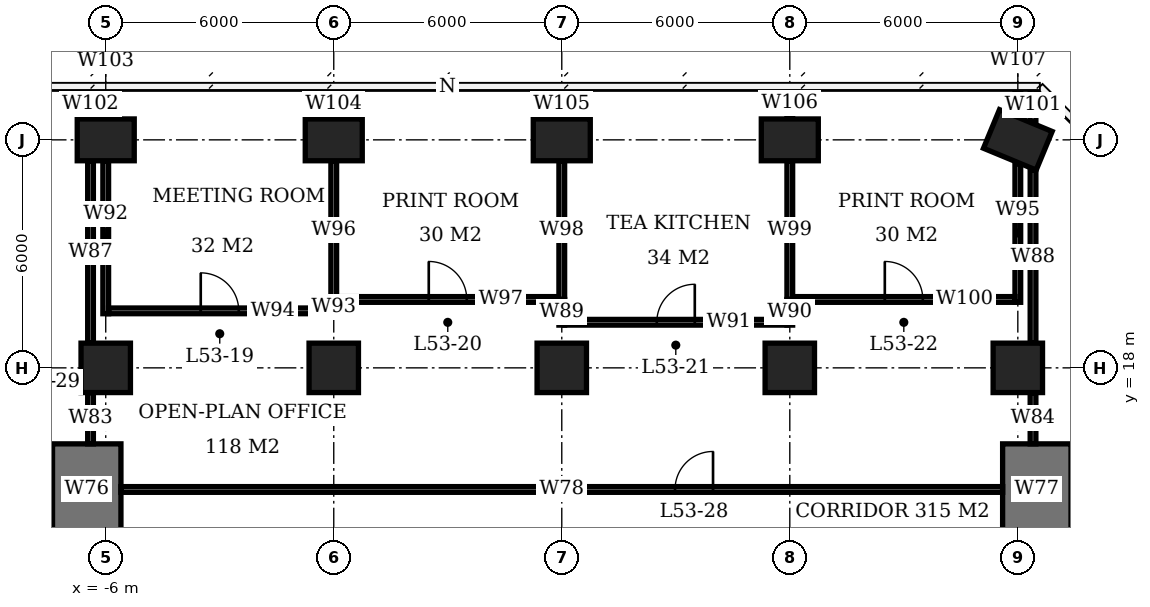
"""IFC4 building model, lengths in metres.
Left out: names, types, materials, properties, quantities, classifications, styles, units other than length and angle.
Written with IfcOpenShell. Run it as: python <this file> out.ifc"""

import sys

from ifc_helpers import new_model, si_unit, direction, frame, frame_2d, origin, origin_2d, place, context, subcontext, project, spatial, rectangle, extrude, element, fill, save


model = new_model("IFC4")
c1 = context("Model", 3, precision=1e-05, world=origin(), true_north=direction((0.0, 1.0)))
c2 = subcontext(c1, "Body", "Model", "MODEL_VIEW")
j1 = project(units=[si_unit("LENGTHUNIT", "METRE"), si_unit("PLANEANGLEUNIT", "RADIAN")], contexts=[c1])
p1 = place(None, origin())
s1 = spatial("IfcSite", under=j1, at=p1, CompositionType="ELEMENT")
p2 = place(p1, origin())
s2 = spatial("IfcBuilding", under=s1, at=p2, CompositionType="ELEMENT")
p3 = place(p2, frame((0.0, 0.0, 216.2)))
s3 = spatial("IfcBuildingStorey", under=s2, at=p3, CompositionType="ELEMENT", Elevation=216.2)
p4 = place(p3, frame((-6.0, 18.0, 0.0), z_axis=(0.0, 0.0, 1.0), x_axis=(1.0, 0.0, 0.0)))
e1 = element("IfcColumn", 1, at=p4, inside=s3, PredefinedType="COLUMN", context=c2, shape_type="SweptSolid", body=[
    extrude(rectangle(XDim=1.3, YDim=1.3, at=origin_2d()), origin(), (0.0, 0.0, 1.0), 3.9),
])
p5 = place(p3, frame((-6.0, 24.0, 0.0), z_axis=(0.0, 0.0, 1.0), x_axis=(1.0, 0.0, 0.0)))
e2 = element("IfcColumn", 2, at=p5, inside=s3, PredefinedType="COLUMN", context=c2, shape_type="SweptSolid", body=[
    extrude(rectangle(XDim=1.5, YDim=1.1, at=origin_2d()), origin(), (0.0, 0.0, 1.0), 3.9),
])
p6 = place(p3, frame((0.0, 18.0, 0.0), z_axis=(0.0, 0.0, 1.0), x_axis=(1.0, 0.0, 0.0)))
e3 = element("IfcColumn", 3, at=p6, inside=s3, PredefinedType="COLUMN", context=c2, shape_type="SweptSolid", body=[
    extrude(rectangle(XDim=1.3, YDim=1.3, at=origin_2d()), origin(), (0.0, 0.0, 1.0), 3.9),
])
p7 = place(p3, frame((0.0, 24.0, 0.0), z_axis=(0.0, 0.0, 1.0), x_axis=(1.0, 0.0, 0.0)))
e4 = element("IfcColumn", 4, at=p7, inside=s3, PredefinedType="COLUMN", context=c2, shape_type="SweptSolid", body=[
    extrude(rectangle(XDim=1.5, YDim=1.1, at=origin_2d()), origin(), (0.0, 0.0, 1.0), 3.9),
])
p8 = place(p3, frame((6.0, 18.0, 0.0), z_axis=(0.0, 0.0, 1.0), x_axis=(1.0, 0.0, 0.0)))
e5 = element("IfcColumn", 5, at=p8, inside=s3, PredefinedType="COLUMN", context=c2, shape_type="SweptSolid", body=[
    extrude(rectangle(XDim=1.3, YDim=1.3, at=origin_2d()), origin(), (0.0, 0.0, 1.0), 3.9),
])
p9 = place(p3, frame((6.0, 24.0, 0.0), z_axis=(0.0, 0.0, 1.0), x_axis=(1.0, 0.0, 0.0)))
e6 = element("IfcColumn", 6, at=p9, inside=s3, PredefinedType="COLUMN", context=c2, shape_type="SweptSolid", body=[
    extrude(rectangle(XDim=1.5, YDim=1.1, at=origin_2d()), origin(), (0.0, 0.0, 1.0), 3.9),
])
p10 = place(p3, frame((12.0, 18.0, 0.0), z_axis=(0.0, 0.0, 1.0), x_axis=(1.0, 0.0, 0.0)))
e7 = element("IfcColumn", 7, at=p10, inside=s3, PredefinedType="COLUMN", context=c2, shape_type="SweptSolid", body=[
    extrude(rectangle(XDim=1.3, YDim=1.3, at=origin_2d()), origin(), (0.0, 0.0, 1.0), 3.9),
])
p11 = place(p3, frame((12.0, 24.0, 0.0), z_axis=(0.0, 0.0, 1.0), x_axis=(1.0, 0.0, 0.0)))
e8 = element("IfcColumn", 8, at=p11, inside=s3, PredefinedType="COLUMN", context=c2, shape_type="SweptSolid", body=[
    extrude(rectangle(XDim=1.5, YDim=1.1, at=origin_2d()), origin(), (0.0, 0.0, 1.0), 3.9),
])
p12 = place(p3, frame((18.0, 18.0, 0.0), z_axis=(0.0, 0.0, 1.0), x_axis=(1.0, 0.0, 0.0)))
e9 = element("IfcColumn", 9, at=p12, inside=s3, PredefinedType="COLUMN", context=c2, shape_type="SweptSolid", body=[
    extrude(rectangle(XDim=1.3, YDim=1.3, at=origin_2d()), origin(), (0.0, 0.0, 1.0), 3.9),
])
p13 = place(p3, frame((18.0, 24.0, 0.0), z_axis=(0.0, 0.0, 1.0), x_axis=(0.923879532511, -0.382683432365, 0.0)))
e10 = element("IfcColumn", 10, at=p13, inside=s3, PredefinedType="COLUMN", context=c2, shape_type="SweptSolid", body=[
    extrude(rectangle(XDim=1.5, YDim=1.1, at=origin_2d()), origin(), (0.0, 0.0, 1.0), 3.9),
])
for number, where, z_axis, x_axis in (
    (11, (-6.5, 13.6, 0.0), (0.0, 0.0, 1.0), (0.0, 1.0, 0.0)),
    (12, (18.5, 13.6, 0.0), (0.0, 0.0, 1.0), (0.0, 1.0, 0.0)),
):
    element("IfcWall", number, at=place(p3, frame(where, z_axis=z_axis, x_axis=x_axis)), inside=s3, PredefinedType="SHEAR", context=c2, shape_type="SweptSolid", body=[
        extrude(rectangle(XDim=2.4, YDim=1.8, at=frame_2d((1.2, 0.0))), origin(), (0.0, 0.0, 1.0), 3.9),
    ])
p14 = place(p3, frame((6.075, 19.2, 0.0), z_axis=(0.0, 0.0, 1.0), x_axis=(1.0, 0.0, 0.0)))
e13 = element("IfcWall", 13, at=p14, inside=s3, PredefinedType="PARTITIONING", context=c2, shape_type="SweptSolid", body=[
    extrude(rectangle(XDim=5.85, YDim=0.15, at=frame_2d((2.925, 0.0))), origin(), (0.0, 0.0, 1.0), 3.65),
])
p15 = place(p14, frame((2.425, 0.0, 0.0)))
e14 = element("IfcOpeningElement", 14, at=p15, cuts=e13, PredefinedType="OPENING", context=c2, shape_type="SweptSolid", body=[
    extrude(rectangle(XDim=1.0, YDim=2.1, at=frame_2d((0.5, 1.05))), frame((0.0, 0.085, 0.0), z_axis=(0.0, -1.0, 0.0), x_axis=(1.0, 0.0, 0.0)), (0.0, 0.0, 1.0), 0.17),
])
p16 = place(p3, frame((-5.925, 19.5, 0.0), z_axis=(0.0, 0.0, 1.0), x_axis=(1.0, 0.0, 0.0)))
e15 = element("IfcWall", 15, at=p16, inside=s3, PredefinedType="PARTITIONING", context=c2, shape_type="SweptSolid", body=[
    extrude(rectangle(XDim=5.85, YDim=0.15, at=frame_2d((2.925, 0.0))), origin(), (0.0, 0.0, 1.0), 3.65),
])
p17 = place(p16, frame((2.425, 0.0, 0.0)))
e16 = element("IfcOpeningElement", 16, at=p17, cuts=e15, PredefinedType="OPENING", context=c2, shape_type="SweptSolid", body=[
    extrude(rectangle(XDim=1.0, YDim=2.1, at=frame_2d((0.5, 1.05))), frame((0.0, 0.085, 0.0), z_axis=(0.0, -1.0, 0.0), x_axis=(1.0, 0.0, 0.0)), (0.0, 0.0, 1.0), 0.17),
])
p18 = place(p3, frame((0.075, 19.8, 0.0), z_axis=(0.0, 0.0, 1.0), x_axis=(1.0, 0.0, 0.0)))
e17 = element("IfcWall", 17, at=p18, inside=s3, PredefinedType="PARTITIONING", context=c2, shape_type="SweptSolid", body=[
    extrude(rectangle(XDim=5.85, YDim=0.15, at=frame_2d((2.925, 0.0))), origin(), (0.0, 0.0, 1.0), 3.65),
])
p19 = place(p18, frame((2.425, 0.0, 0.0)))
e18 = element("IfcOpeningElement", 18, at=p19, cuts=e17, PredefinedType="OPENING", context=c2, shape_type="SweptSolid", body=[
    extrude(rectangle(XDim=1.0, YDim=2.1, at=frame_2d((0.5, 1.05))), frame((0.0, 0.085, 0.0), z_axis=(0.0, -1.0, 0.0), x_axis=(1.0, 0.0, 0.0)), (0.0, 0.0, 1.0), 0.17),
])
p20 = place(p3, frame((12.075, 19.8, 0.0), z_axis=(0.0, 0.0, 1.0), x_axis=(1.0, 0.0, 0.0)))
e19 = element("IfcWall", 19, at=p20, inside=s3, PredefinedType="PARTITIONING", context=c2, shape_type="SweptSolid", body=[
    extrude(rectangle(XDim=5.85, YDim=0.15, at=frame_2d((2.925, 0.0))), origin(), (0.0, 0.0, 1.0), 3.65),
])
p21 = place(p20, frame((2.425, 0.0, 0.0)))
e20 = element("IfcOpeningElement", 20, at=p21, cuts=e19, PredefinedType="OPENING", context=c2, shape_type="SweptSolid", body=[
    extrude(rectangle(XDim=1.0, YDim=2.1, at=frame_2d((0.5, 1.05))), frame((0.0, 0.085, 0.0), z_axis=(0.0, -1.0, 0.0), x_axis=(1.0, 0.0, 0.0)), (0.0, 0.0, 1.0), 0.17),
])
p22 = place(p3, frame((-6.0, 19.425, 0.0), z_axis=(0.0, 0.0, 1.0), x_axis=(0.0, 1.0, 0.0)))
e21 = element("IfcWall", 21, at=p22, inside=s3, PredefinedType="PARTITIONING", context=c2, shape_type="SweptSolid", body=[
    extrude(rectangle(XDim=4.025, YDim=0.15, at=frame_2d((2.012, 0.0))), origin(), (0.0, 0.0, 1.0), 3.65),
])
p23 = place(p3, frame((-6.0, 24.55, 0.0), z_axis=(0.0, 0.0, 1.0), x_axis=(0.0, 1.0, 0.0)))
e22 = element("IfcWall", 22, at=p23, inside=s3, PredefinedType="PARTITIONING", context=c2, shape_type="SweptSolid", body=[
    extrude(rectangle(XDim=0.85, YDim=0.15, at=frame_2d((0.425, 0.0))), origin(), (0.0, 0.0, 1.0), 3.65),
])
p24 = place(p3, frame((0.0, 19.425, 0.0), z_axis=(0.0, 0.0, 1.0), x_axis=(0.0, 1.0, 0.0)))
e23 = element("IfcWall", 23, at=p24, inside=s3, PredefinedType="PARTITIONING", context=c2, shape_type="SweptSolid", body=[
    extrude(rectangle(XDim=0.375, YDim=0.15, at=frame_2d((0.188, 0.0))), origin(), (0.0, 0.0, 1.0), 3.65),
])
p25 = place(p3, frame((0.0, 19.8, 0.0), z_axis=(0.0, 0.0, 1.0), x_axis=(0.0, 1.0, 0.0)))
e24 = element("IfcWall", 24, at=p25, inside=s3, PredefinedType="PARTITIONING", context=c2, shape_type="SweptSolid", body=[
    extrude(rectangle(XDim=3.65, YDim=0.15, at=frame_2d((1.825, 0.0))), origin(), (0.0, 0.0, 1.0), 3.65),
])
p26 = place(p3, frame((0.0, 24.55, 0.0), z_axis=(0.0, 0.0, 1.0), x_axis=(0.0, 1.0, 0.0)))
e25 = element("IfcWall", 25, at=p26, inside=s3, PredefinedType="PARTITIONING", context=c2, shape_type="SweptSolid", body=[
    extrude(rectangle(XDim=0.8, YDim=0.15, at=frame_2d((0.4, 0.0))), origin(), (0.0, 0.0, 1.0), 3.65),
])
p27 = place(p3, frame((6.0, 19.125, 0.0), z_axis=(0.0, 0.0, 1.0), x_axis=(0.0, 1.0, 0.0)))
e26 = element("IfcWall", 26, at=p27, inside=s3, PredefinedType="PARTITIONING", context=c2, shape_type="SweptSolid", body=[
    extrude(rectangle(XDim=0.675, YDim=0.15, at=frame_2d((0.337, 0.0))), origin(), (0.0, 0.0, 1.0), 3.65),
])
p28 = place(p3, frame((6.0, 19.8, 0.0), z_axis=(0.0, 0.0, 1.0), x_axis=(0.0, 1.0, 0.0)))
e27 = element("IfcWall", 27, at=p28, inside=s3, PredefinedType="PARTITIONING", context=c2, shape_type="SweptSolid", body=[
    extrude(rectangle(XDim=3.65, YDim=0.15, at=frame_2d((1.825, 0.0))), origin(), (0.0, 0.0, 1.0), 3.65),
])
p29 = place(p3, frame((6.0, 24.55, 0.0), z_axis=(0.0, 0.0, 1.0), x_axis=(0.0, 1.0, 0.0)))
e28 = element("IfcWall", 28, at=p29, inside=s3, PredefinedType="PARTITIONING", context=c2, shape_type="SweptSolid", body=[
    extrude(rectangle(XDim=0.8, YDim=0.15, at=frame_2d((0.4, 0.0))), origin(), (0.0, 0.0, 1.0), 3.65),
])
p30 = place(p3, frame((12.0, 19.125, 0.0), z_axis=(0.0, 0.0, 1.0), x_axis=(0.0, 1.0, 0.0)))
e29 = element("IfcWall", 29, at=p30, inside=s3, PredefinedType="PARTITIONING", context=c2, shape_type="SweptSolid", body=[
    extrude(rectangle(XDim=0.675, YDim=0.15, at=frame_2d((0.337, 0.0))), origin(), (0.0, 0.0, 1.0), 3.65),
])
p31 = place(p3, frame((12.0, 19.8, 0.0), z_axis=(0.0, 0.0, 1.0), x_axis=(0.0, 1.0, 0.0)))
e30 = element("IfcWall", 30, at=p31, inside=s3, PredefinedType="PARTITIONING", context=c2, shape_type="SweptSolid", body=[
    extrude(rectangle(XDim=3.65, YDim=0.15, at=frame_2d((1.825, 0.0))), origin(), (0.0, 0.0, 1.0), 3.65),
])
p32 = place(p3, frame((12.0, 24.55, 0.0), z_axis=(0.0, 0.0, 1.0), x_axis=(0.0, 1.0, 0.0)))
e31 = element("IfcWall", 31, at=p32, inside=s3, PredefinedType="PARTITIONING", context=c2, shape_type="SweptSolid", body=[
    extrude(rectangle(XDim=0.85, YDim=0.15, at=frame_2d((0.425, 0.0))), origin(), (0.0, 0.0, 1.0), 3.65),
])
p33 = place(p3, frame((18.0, 19.725, 0.0), z_axis=(0.0, 0.0, 1.0), x_axis=(0.0, 1.0, 0.0)))
e32 = element("IfcWall", 32, at=p33, inside=s3, PredefinedType="PARTITIONING", context=c2, shape_type="SweptSolid", body=[
    extrude(rectangle(XDim=3.648, YDim=0.15, at=frame_2d((1.824, 0.0))), origin(), (0.0, 0.0, 1.0), 3.65),
])
p34 = place(p3, frame((18.0, 24.626, 0.0), z_axis=(0.0, 0.0, 1.0), x_axis=(0.0, 1.0, 0.0)))
e33 = element("IfcWall", 33, at=p34, inside=s3, PredefinedType="PARTITIONING", context=c2, shape_type="SweptSolid", body=[
    extrude(rectangle(XDim=0.773, YDim=0.15, at=frame_2d((0.387, 0.0))), origin(), (0.0, 0.0, 1.0), 3.65),
])
p35 = place(p3, frame((-6.4, 16.0, 0.0), z_axis=(0.0, 0.0, 1.0), x_axis=(0.0, 1.0, 0.0)))
e34 = element("IfcWall", 34, at=p35, inside=s3, PredefinedType="PARTITIONING", context=c2, shape_type="SweptSolid", body=[
    extrude(rectangle(XDim=1.35, YDim=0.15, at=frame_2d((0.675, 0.0))), origin(), (0.0, 0.0, 1.0), 3.65),
])
p36 = place(p3, frame((-6.4, 18.65, 0.0), z_axis=(0.0, 0.0, 1.0), x_axis=(0.0, 1.0, 0.0)))
e35 = element("IfcWall", 35, at=p36, inside=s3, PredefinedType="PARTITIONING", context=c2, shape_type="SweptSolid", body=[
    extrude(rectangle(XDim=4.8, YDim=0.15, at=frame_2d((2.4, 0.0))), origin(), (0.0, 0.0, 1.0), 3.65),
])
p37 = place(p3, frame((-6.4, 24.55, 0.0), z_axis=(0.0, 0.0, 1.0), x_axis=(0.0, 1.0, 0.0)))
e36 = element("IfcWall", 36, at=p37, inside=s3, PredefinedType="PARTITIONING", context=c2, shape_type="SweptSolid", body=[
    extrude(rectangle(XDim=0.8, YDim=0.15, at=frame_2d((0.4, 0.0))), origin(), (0.0, 0.0, 1.0), 3.65),
])
p38 = place(p3, frame((-5.6, 14.8, 0.0), z_axis=(0.0, 0.0, 1.0), x_axis=(1.0, 0.0, 0.0)))
e37 = element("IfcWall", 37, at=p38, inside=s3, PredefinedType="PARTITIONING", context=c2, shape_type="SweptSolid", body=[
    extrude(rectangle(XDim=23.2, YDim=0.15, at=frame_2d((11.6, 0.0))), origin(), (0.0, 0.0, 1.0), 3.65),
])
p39 = place(p38, frame((14.58, 0.0, 0.0)))
e38 = element("IfcOpeningElement", 38, at=p39, cuts=e37, PredefinedType="OPENING", context=c2, shape_type="SweptSolid", body=[
    extrude(rectangle(XDim=1.0, YDim=2.1, at=frame_2d((0.5, 1.05))), frame((0.0, 0.085, 0.0), z_axis=(0.0, -1.0, 0.0), x_axis=(1.0, 0.0, 0.0)), (0.0, 0.0, 1.0), 0.17),
])
p40 = place(p3, frame((18.4, 16.0, 0.0), z_axis=(0.0, 0.0, 1.0), x_axis=(0.0, 1.0, 0.0)))
e39 = element("IfcWall", 39, at=p40, inside=s3, PredefinedType="PARTITIONING", context=c2, shape_type="SweptSolid", body=[
    extrude(rectangle(XDim=1.35, YDim=0.15, at=frame_2d((0.675, 0.0))), origin(), (0.0, 0.0, 1.0), 3.65),
])
p41 = place(p3, frame((18.4, 18.65, 0.0), z_axis=(0.0, 0.0, 1.0), x_axis=(0.0, 1.0, 0.0)))
e40 = element("IfcWall", 40, at=p41, inside=s3, PredefinedType="PARTITIONING", context=c2, shape_type="SweptSolid", body=[
    extrude(rectangle(XDim=4.558, YDim=0.15, at=frame_2d((2.279, 0.0))), origin(), (0.0, 0.0, 1.0), 3.65),
])
p42 = place(p3, frame((18.4, 24.461, 0.0), z_axis=(0.0, 0.0, 1.0), x_axis=(0.0, 1.0, 0.0)))
e41 = element("IfcWall", 41, at=p42, inside=s3, PredefinedType="PARTITIONING", context=c2, shape_type="SweptSolid", body=[
    extrude(rectangle(XDim=0.939, YDim=0.15, at=frame_2d((0.47, 0.0))), origin(), (0.0, 0.0, 1.0), 3.65),
])
p43 = place(p17, origin())
e42 = element("IfcDoor", 42, at=p43, inside=s3, OperationType="SINGLE_SWING_LEFT", PredefinedType="DOOR", context=c2, shape_type="SweptSolid", body=[
    extrude(rectangle(XDim=1.0, YDim=2.1, at=frame_2d((0.5, 1.05))), frame((0.0, 0.025, 0.0), z_axis=(0.0, -1.0, 0.0), x_axis=(1.0, 0.0, 0.0)), (0.0, 0.0, 1.0), 0.05),
])
fill(e16, e42)
p44 = place(p19, origin())
e43 = element("IfcDoor", 43, at=p44, inside=s3, OperationType="SINGLE_SWING_LEFT", PredefinedType="DOOR", context=c2, shape_type="SweptSolid", body=[
    extrude(rectangle(XDim=1.0, YDim=2.1, at=frame_2d((0.5, 1.05))), frame((0.0, 0.025, 0.0), z_axis=(0.0, -1.0, 0.0), x_axis=(1.0, 0.0, 0.0)), (0.0, 0.0, 1.0), 0.05),
])
fill(e18, e43)
p45 = place(p15, origin())
e44 = element("IfcDoor", 44, at=p45, inside=s3, OperationType="SINGLE_SWING_RIGHT", PredefinedType="DOOR", context=c2, shape_type="SweptSolid", body=[
    extrude(rectangle(XDim=1.0, YDim=2.1, at=frame_2d((0.5, 1.05))), frame((0.0, 0.025, 0.0), z_axis=(0.0, -1.0, 0.0), x_axis=(1.0, 0.0, 0.0)), (0.0, 0.0, 1.0), 0.05),
])
fill(e14, e44)
p46 = place(p21, origin())
e45 = element("IfcDoor", 45, at=p46, inside=s3, OperationType="SINGLE_SWING_LEFT", PredefinedType="DOOR", context=c2, shape_type="SweptSolid", body=[
    extrude(rectangle(XDim=1.0, YDim=2.1, at=frame_2d((0.5, 1.05))), frame((0.0, 0.025, 0.0), z_axis=(0.0, -1.0, 0.0), x_axis=(1.0, 0.0, 0.0)), (0.0, 0.0, 1.0), 0.05),
])
fill(e20, e45)
p47 = place(p39, origin())
e46 = element("IfcDoor", 46, at=p47, inside=s3, OperationType="SINGLE_SWING_RIGHT", PredefinedType="DOOR", context=c2, shape_type="SweptSolid", body=[
    extrude(rectangle(XDim=1.0, YDim=2.1, at=frame_2d((0.5, 1.05))), frame((0.0, 0.025, 0.0), z_axis=(0.0, -1.0, 0.0), x_axis=(1.0, 0.0, 0.0)), (0.0, 0.0, 1.0), 0.05),
])
fill(e38, e46)
save(model, sys.argv[1])
